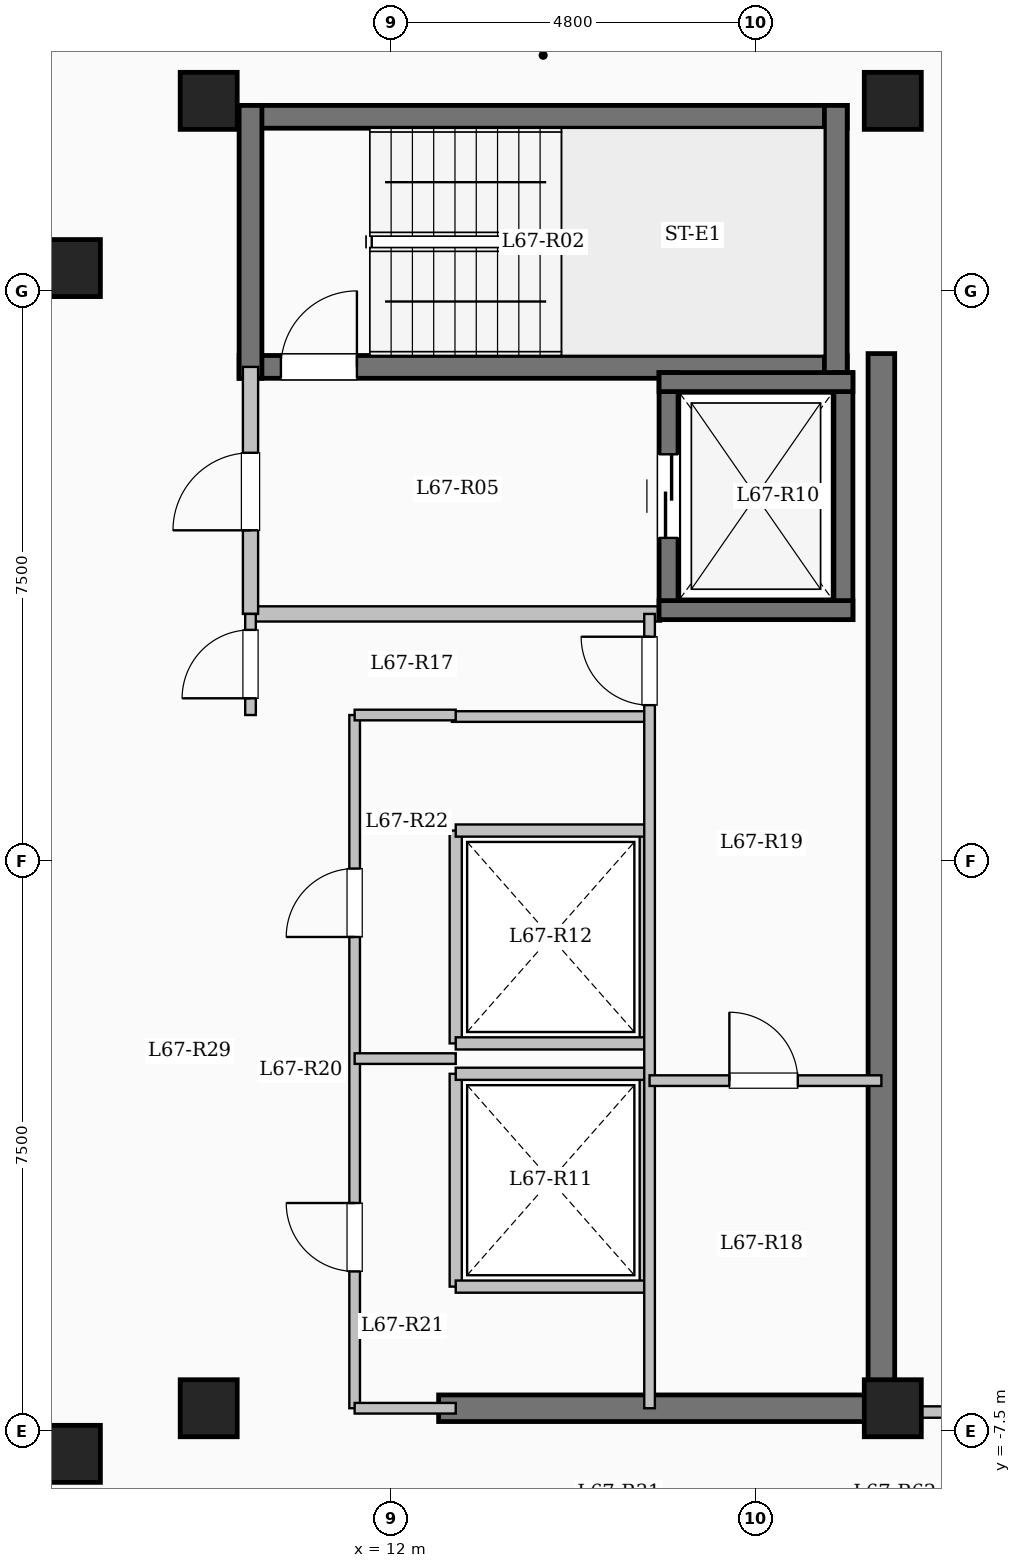
"""IFC4 building model, lengths in metres.
Left out: names, types, materials, properties, quantities, classifications, styles, units other than length and angle.
Written with IfcOpenShell. Run it as: python <this file> out.ifc"""

import sys

from ifc_helpers import new_model, si_unit, direction, frame, frame_2d, origin, origin_2d, place, context, subcontext, project, spatial, rectangle, extrude, element, fill, save


model = new_model("IFC4")
c1 = context("Model", 3, precision=1e-05, world=origin(), true_north=direction((0.0, 1.0)))
c2 = subcontext(c1, "Body", "Model", "MODEL_VIEW")
j1 = project(units=[si_unit("LENGTHUNIT", "METRE"), si_unit("PLANEANGLEUNIT", "RADIAN")], contexts=[c1])
p1 = place(None, origin())
s1 = spatial("IfcSite", under=j1, at=p1, CompositionType="ELEMENT")
p2 = place(p1, origin())
s2 = spatial("IfcBuilding", under=s1, at=p2, CompositionType="ELEMENT")
p3 = place(p2, frame((0.0, 0.0, 248.2)))
s3 = spatial("IfcBuildingStorey", under=s2, at=p3, CompositionType="ELEMENT", Elevation=248.2)
for number, where, z_axis, x_axis in (
    (1, (7.8, -7.8, 0.0), (0.0, 0.0, 1.0), (1.0, 0.0, 0.0)),
    (2, (7.8, 7.8, 0.0), (0.0, 0.0, 1.0), (1.0, 0.0, 0.0)),
    (3, (9.6, -7.2, 0.0), (0.0, 0.0, 1.0), (1.0, 0.0, 0.0)),
    (4, (9.6, 10.0, 0.0), (0.0, 0.0, 1.0), (1.0, 0.0, 0.0)),
    (5, (18.6, -7.2, 0.0), (0.0, 0.0, 1.0), (1.0, 0.0, 0.0)),
    (6, (18.6, 10.0, 0.0), (0.0, 0.0, 1.0), (1.0, 0.0, 0.0)),
):
    element("IfcColumn", number, at=place(p3, frame(where, z_axis=z_axis, x_axis=x_axis)), inside=s3, PredefinedType="COLUMN", context=c2, shape_type="SweptSolid", body=[
        extrude(rectangle(XDim=0.75, YDim=0.75, at=origin_2d()), origin(), (0.0, 0.0, 1.0), 3.35),
    ])
p4 = place(p3, frame((10.0, 9.79, 0.0), z_axis=(0.0, 0.0, 1.0), x_axis=(1.0, 0.0, 0.0)))
e7 = element("IfcWall", 7, at=p4, inside=s3, PredefinedType="SHEAR", context=c2, shape_type="SweptSolid", body=[
    extrude(rectangle(XDim=8.0, YDim=0.3, at=frame_2d((4.0, 0.0))), origin(), (0.0, 0.0, 1.0), 3.35),
])
p5 = place(p3, frame((10.0, 6.5, 0.0), z_axis=(0.0, 0.0, 1.0), x_axis=(1.0, 0.0, 0.0)))
e8 = element("IfcWall", 8, at=p5, inside=s3, PredefinedType="SHEAR", context=c2, shape_type="SweptSolid", body=[
    extrude(rectangle(XDim=8.0, YDim=0.3, at=frame_2d((4.0, 0.0))), origin(), (0.0, 0.0, 1.0), 3.35),
])
p6 = place(p5, frame((0.55, 0.0, 0.0)))
e9 = element("IfcOpeningElement", 9, at=p6, cuts=e8, PredefinedType="OPENING", context=c2, shape_type="SweptSolid", body=[
    extrude(rectangle(XDim=1.0, YDim=2.15, at=frame_2d((0.5, 1.075))), frame((0.0, 0.16, 0.0), z_axis=(0.0, -1.0, 0.0), x_axis=(1.0, 0.0, 0.0)), (0.0, 0.0, 1.0), 0.32),
])
for number, where, z_axis, x_axis in (
    (10, (10.15, 6.35, 0.0), (0.0, 0.0, 1.0), (0.0, 1.0, 0.0)),
    (11, (17.85, 6.35, 0.0), (0.0, 0.0, 1.0), (0.0, 1.0, 0.0)),
):
    element("IfcWall", number, at=place(p3, frame(where, z_axis=z_axis, x_axis=x_axis)), inside=s3, PredefinedType="SHEAR", context=c2, shape_type="SweptSolid", body=[
        extrude(rectangle(XDim=3.59, YDim=0.3, at=frame_2d((1.795, 0.0))), origin(), (0.0, 0.0, 1.0), 3.35),
    ])
p7 = place(p3, frame((10.15, 3.25, 0.0), z_axis=(0.0, 0.0, 1.0), x_axis=(1.0, 0.0, 0.0)))
e12 = element("IfcWall", 12, at=p7, inside=s3, PredefinedType="SOLIDWALL", context=c2, shape_type="SweptSolid", body=[
    extrude(rectangle(XDim=5.4, YDim=0.2, at=frame_2d((2.7, 0.0))), origin(), (0.0, 0.0, 1.0), 3.1),
])
p8 = place(p3, frame((10.15, 3.25, 0.0), z_axis=(0.0, 0.0, 1.0), x_axis=(0.0, 1.0, 0.0)))
e13 = element("IfcWall", 13, at=p8, inside=s3, PredefinedType="SOLIDWALL", context=c2, shape_type="SweptSolid", body=[
    extrude(rectangle(XDim=3.25, YDim=0.2, at=frame_2d((1.625, 0.0))), origin(), (0.0, 0.0, 1.0), 3.1),
])
p9 = place(p8, frame((1.1, 0.0, 0.0)))
e14 = element("IfcOpeningElement", 14, at=p9, cuts=e13, PredefinedType="OPENING", context=c2, shape_type="SweptSolid", body=[
    extrude(rectangle(XDim=1.02, YDim=2.15, at=frame_2d((0.51, 1.075))), frame((0.0, 0.11, 0.0), z_axis=(0.0, -1.0, 0.0), x_axis=(1.0, 0.0, 0.0)), (0.0, 0.0, 1.0), 0.22),
])
p10 = place(p3, frame((15.65, 3.175, 0.0), z_axis=(0.0, 0.0, 1.0), x_axis=(0.0, 1.0, 0.0)))
e15 = element("IfcWall", 15, at=p10, inside=s3, PredefinedType="SHEAR", context=c2, shape_type="SweptSolid", body=[
    extrude(rectangle(XDim=3.25, YDim=0.25, at=frame_2d((1.625, 0.0))), origin(), (0.0, 0.0, 1.0), 3.35),
])
p11 = place(p10, frame((1.075, 0.0, 0.0)))
e16 = element("IfcOpeningElement", 16, at=p11, cuts=e15, PredefinedType="OPENING", context=c2, shape_type="SweptSolid", body=[
    extrude(rectangle(XDim=1.1, YDim=2.15, at=frame_2d((0.55, 1.075))), frame((0.0, 0.135, 0.0), z_axis=(0.0, -1.0, 0.0), x_axis=(1.0, 0.0, 0.0)), (0.0, 0.0, 1.0), 0.27),
])
p12 = place(p3, frame((17.95, 3.175, 0.0), z_axis=(0.0, 0.0, 1.0), x_axis=(0.0, 1.0, 0.0)))
e17 = element("IfcWall", 17, at=p12, inside=s3, PredefinedType="SHEAR", context=c2, shape_type="SweptSolid", body=[
    extrude(rectangle(XDim=3.25, YDim=0.25, at=frame_2d((1.625, 0.0))), origin(), (0.0, 0.0, 1.0), 3.35),
])
for number, where, z_axis, x_axis in (
    (18, (15.525, 3.3, 0.0), (0.0, 0.0, 1.0), (1.0, 0.0, 0.0)),
    (19, (15.525, 6.3, 0.0), (0.0, 0.0, 1.0), (1.0, 0.0, 0.0)),
):
    element("IfcWall", number, at=place(p3, frame(where, z_axis=z_axis, x_axis=x_axis)), inside=s3, PredefinedType="SHEAR", context=c2, shape_type="SweptSolid", body=[
        extrude(rectangle(XDim=2.55, YDim=0.25, at=frame_2d((1.275, 0.0))), origin(), (0.0, 0.0, 1.0), 3.35),
    ])
for number, where, z_axis, x_axis in (
    (20, (12.85, -5.6, 0.0), (0.0, 0.0, 1.0), (0.0, 1.0, 0.0)),
    (21, (15.35, -5.6, 0.0), (0.0, 0.0, 1.0), (0.0, 1.0, 0.0)),
):
    element("IfcWall", number, at=place(p3, frame(where, z_axis=z_axis, x_axis=x_axis)), inside=s3, PredefinedType="SOLIDWALL", context=c2, shape_type="SweptSolid", body=[
        extrude(rectangle(XDim=2.8, YDim=0.16, at=frame_2d((1.4, 0.0))), origin(), (0.0, 0.0, 1.0), 3.1),
    ])
for number, where, z_axis, x_axis in (
    (22, (12.85, -5.6, 0.0), (0.0, 0.0, 1.0), (1.0, 0.0, 0.0)),
    (23, (12.85, -2.8, 0.0), (0.0, 0.0, 1.0), (1.0, 0.0, 0.0)),
):
    element("IfcWall", number, at=place(p3, frame(where, z_axis=z_axis, x_axis=x_axis)), inside=s3, PredefinedType="SOLIDWALL", context=c2, shape_type="SweptSolid", body=[
        extrude(rectangle(XDim=2.5, YDim=0.16, at=frame_2d((1.25, 0.0))), origin(), (0.0, 0.0, 1.0), 3.1),
    ])
for number, where, z_axis, x_axis in (
    (24, (12.85, -2.4, 0.0), (0.0, 0.0, 1.0), (0.0, 1.0, 0.0)),
    (25, (15.35, -2.4, 0.0), (0.0, 0.0, 1.0), (0.0, 1.0, 0.0)),
):
    element("IfcWall", number, at=place(p3, frame(where, z_axis=z_axis, x_axis=x_axis)), inside=s3, PredefinedType="SOLIDWALL", context=c2, shape_type="SweptSolid", body=[
        extrude(rectangle(XDim=2.8, YDim=0.16, at=frame_2d((1.4, 0.0))), origin(), (0.0, 0.0, 1.0), 3.1),
    ])
for number, where, z_axis, x_axis in (
    (26, (12.85, -2.4, 0.0), (0.0, 0.0, 1.0), (1.0, 0.0, 0.0)),
    (27, (12.85, 0.4, 0.0), (0.0, 0.0, 1.0), (1.0, 0.0, 0.0)),
):
    element("IfcWall", number, at=place(p3, frame(where, z_axis=z_axis, x_axis=x_axis)), inside=s3, PredefinedType="SOLIDWALL", context=c2, shape_type="SweptSolid", body=[
        extrude(rectangle(XDim=2.5, YDim=0.16, at=frame_2d((1.25, 0.0))), origin(), (0.0, 0.0, 1.0), 3.1),
    ])
p13 = place(p3, frame((18.45, -7.375, 0.0), z_axis=(0.0, 0.0, 1.0), x_axis=(0.0, 1.0, 0.0)))
e28 = element("IfcWall", 28, at=p13, inside=s3, PredefinedType="SHEAR", context=c2, shape_type="SweptSolid", body=[
    extrude(rectangle(XDim=14.05, YDim=0.35, at=frame_2d((7.025, 0.0))), origin(), (0.0, 0.0, 1.0), 3.35),
])
p14 = place(p3, frame((12.625, -7.2, 0.0), z_axis=(0.0, 0.0, 1.0), x_axis=(1.0, 0.0, 0.0)))
e29 = element("IfcWall", 29, at=p14, inside=s3, PredefinedType="SHEAR", context=c2, shape_type="SweptSolid", body=[
    extrude(rectangle(XDim=6.0, YDim=0.35, at=frame_2d((3.0, 0.0))), origin(), (0.0, 0.0, 1.0), 3.35),
])
p15 = place(p3, frame((12.8, 1.9, 0.0), z_axis=(0.0, 0.0, 1.0), x_axis=(1.0, 0.0, 0.0)))
e30 = element("IfcWall", 30, at=p15, inside=s3, PredefinedType="PARTITIONING", context=c2, shape_type="SweptSolid", body=[
    extrude(rectangle(XDim=2.6, YDim=0.14, at=frame_2d((1.3, 0.0))), origin(), (0.0, 0.0, 1.0), 3.1),
])
p16 = place(p3, frame((10.15, 1.92, 0.0), z_axis=(0.0, 0.0, 1.0), x_axis=(0.0, 1.0, 0.0)))
e31 = element("IfcWall", 31, at=p16, inside=s3, PredefinedType="PARTITIONING", context=c2, shape_type="SweptSolid", body=[
    extrude(rectangle(XDim=1.33, YDim=0.14, at=frame_2d((0.665, 0.0))), origin(), (0.0, 0.0, 1.0), 3.1),
])
p17 = place(p16, frame((0.22, 0.0, 0.0)))
e32 = element("IfcOpeningElement", 32, at=p17, cuts=e31, PredefinedType="OPENING", context=c2, shape_type="SweptSolid", body=[
    extrude(rectangle(XDim=0.9, YDim=2.08, at=frame_2d((0.45, 1.04))), frame((0.0, 0.08, 0.0), z_axis=(0.0, -1.0, 0.0), x_axis=(1.0, 0.0, 0.0)), (0.0, 0.0, 1.0), 0.16),
])
p18 = place(p3, frame((15.4, -7.2, 0.0), z_axis=(0.0, 0.0, 1.0), x_axis=(0.0, 1.0, 0.0)))
e33 = element("IfcWall", 33, at=p18, inside=s3, PredefinedType="PARTITIONING", context=c2, shape_type="SweptSolid", body=[
    extrude(rectangle(XDim=10.45, YDim=0.14, at=frame_2d((5.225, 0.0))), origin(), (0.0, 0.0, 1.0), 3.1),
])
p19 = place(p18, frame((9.25, 0.0, 0.0)))
e34 = element("IfcOpeningElement", 34, at=p19, cuts=e33, PredefinedType="OPENING", context=c2, shape_type="SweptSolid", body=[
    extrude(rectangle(XDim=0.9, YDim=2.08, at=frame_2d((0.45, 1.04))), frame((0.0, 0.08, 0.0), z_axis=(0.0, -1.0, 0.0), x_axis=(1.0, 0.0, 0.0)), (0.0, 0.0, 1.0), 0.16),
])
p20 = place(p3, frame((15.4, -2.89, 0.0), z_axis=(0.0, 0.0, 1.0), x_axis=(1.0, 0.0, 0.0)))
e35 = element("IfcWall", 35, at=p20, inside=s3, PredefinedType="PARTITIONING", context=c2, shape_type="SweptSolid", body=[
    extrude(rectangle(XDim=3.05, YDim=0.14, at=frame_2d((1.525, 0.0))), origin(), (0.0, 0.0, 1.0), 3.1),
])
p21 = place(p20, frame((1.05, 0.0, 0.0)))
e36 = element("IfcOpeningElement", 36, at=p21, cuts=e35, PredefinedType="OPENING", context=c2, shape_type="SweptSolid", body=[
    extrude(rectangle(XDim=0.9, YDim=2.08, at=frame_2d((0.45, 1.04))), frame((0.0, 0.08, 0.0), z_axis=(0.0, -1.0, 0.0), x_axis=(1.0, 0.0, 0.0)), (0.0, 0.0, 1.0), 0.16),
])
p22 = place(p3, frame((11.52, -7.2, 0.0), z_axis=(0.0, 0.0, 1.0), x_axis=(0.0, 1.0, 0.0)))
e37 = element("IfcWall", 37, at=p22, inside=s3, PredefinedType="PARTITIONING", context=c2, shape_type="SweptSolid", body=[
    extrude(rectangle(XDim=9.12, YDim=0.14, at=frame_2d((4.56, 0.0))), origin(), (0.0, 0.0, 1.0), 3.1),
])
p23 = place(p22, frame((1.8, 0.0, 0.0)))
e38 = element("IfcOpeningElement", 38, at=p23, cuts=e37, PredefinedType="OPENING", context=c2, shape_type="SweptSolid", body=[
    extrude(rectangle(XDim=0.9, YDim=2.08, at=frame_2d((0.45, 1.04))), frame((0.0, 0.08, 0.0), z_axis=(0.0, -1.0, 0.0), x_axis=(1.0, 0.0, 0.0)), (0.0, 0.0, 1.0), 0.16),
])
p24 = place(p22, frame((6.2, 0.0, 0.0)))
e39 = element("IfcOpeningElement", 39, at=p24, cuts=e37, PredefinedType="OPENING", context=c2, shape_type="SweptSolid", body=[
    extrude(rectangle(XDim=0.9, YDim=2.08, at=frame_2d((0.45, 1.04))), frame((0.0, 0.08, 0.0), z_axis=(0.0, -1.0, 0.0), x_axis=(1.0, 0.0, 0.0)), (0.0, 0.0, 1.0), 0.16),
])
p25 = place(p3, frame((11.52, 1.92, 0.0), z_axis=(0.0, 0.0, 1.0), x_axis=(1.0, 0.0, 0.0)))
e40 = element("IfcWall", 40, at=p25, inside=s3, PredefinedType="PARTITIONING", context=c2, shape_type="SweptSolid", body=[
    extrude(rectangle(XDim=1.33, YDim=0.14, at=frame_2d((0.665, 0.0))), origin(), (0.0, 0.0, 1.0), 3.1),
])
p26 = place(p3, frame((11.52, -7.2, 0.0), z_axis=(0.0, 0.0, 1.0), x_axis=(1.0, 0.0, 0.0)))
e41 = element("IfcWall", 41, at=p26, inside=s3, PredefinedType="PARTITIONING", context=c2, shape_type="SweptSolid", body=[
    extrude(rectangle(XDim=1.33, YDim=0.14, at=frame_2d((0.665, 0.0))), origin(), (0.0, 0.0, 1.0), 2.235),
])
p27 = place(p3, frame((11.52, -2.6, 0.0), z_axis=(0.0, 0.0, 1.0), x_axis=(1.0, 0.0, 0.0)))
e42 = element("IfcWall", 42, at=p27, inside=s3, PredefinedType="PARTITIONING", context=c2, shape_type="SweptSolid", body=[
    extrude(rectangle(XDim=1.33, YDim=0.14, at=frame_2d((0.665, 0.0))), origin(), (0.0, 0.0, 1.0), 3.1),
])
p28 = place(p3, frame((18.45, -7.25, 0.0), z_axis=(0.0, 0.0, 1.0), x_axis=(1.0, 0.0, 0.0)))
e43 = element("IfcWall", 43, at=p28, inside=s3, PredefinedType="PARTITIONING", context=c2, shape_type="SweptSolid", body=[
    extrude(rectangle(XDim=4.23, YDim=0.15, at=frame_2d((2.115, 0.0))), origin(), (0.0, 0.0, 1.0), 3.1),
])
p29 = place(p28, frame((1.5, 0.0, 0.0)))
e44 = element("IfcOpeningElement", 44, at=p29, cuts=e43, PredefinedType="OPENING", context=c2, shape_type="SweptSolid", body=[
    extrude(rectangle(XDim=1.08, YDim=2.15, at=frame_2d((0.54, 1.075))), frame((0.0, 0.085, 0.0), z_axis=(0.0, -1.0, 0.0), x_axis=(1.0, 0.0, 0.0)), (0.0, 0.0, 1.0), 0.17),
])
p30 = place(p6, origin())
e45 = element("IfcDoor", 45, at=p30, inside=s3, OperationType="SINGLE_SWING_RIGHT", PredefinedType="DOOR", context=c2, shape_type="SweptSolid", body=[
    extrude(rectangle(XDim=1.0, YDim=2.15, at=frame_2d((0.5, 1.075))), frame((0.0, 0.025, 0.0), z_axis=(0.0, -1.0, 0.0), x_axis=(1.0, 0.0, 0.0)), (0.0, 0.0, 1.0), 0.05),
])
fill(e9, e45)
p31 = place(p9, origin())
e46 = element("IfcDoor", 46, at=p31, inside=s3, OperationType="SINGLE_SWING_LEFT", PredefinedType="DOOR", context=c2, shape_type="SweptSolid", body=[
    extrude(rectangle(XDim=1.02, YDim=2.15, at=frame_2d((0.51, 1.075))), frame((0.0, 0.025, 0.0), z_axis=(0.0, -1.0, 0.0), x_axis=(1.0, 0.0, 0.0)), (0.0, 0.0, 1.0), 0.05),
])
fill(e14, e46)
p32 = place(p11, origin())
e47 = element("IfcDoor", 47, at=p32, inside=s3, OperationType="SLIDING_TO_LEFT", PredefinedType="DOOR", context=c2, shape_type="SweptSolid", body=[
    extrude(rectangle(XDim=1.1, YDim=2.15, at=frame_2d((0.55, 1.075))), frame((0.0, 0.025, 0.0), z_axis=(0.0, -1.0, 0.0), x_axis=(1.0, 0.0, 0.0)), (0.0, 0.0, 1.0), 0.05),
])
fill(e16, e47)
p33 = place(p17, origin())
e48 = element("IfcDoor", 48, at=p33, inside=s3, OperationType="SINGLE_SWING_LEFT", PredefinedType="DOOR", context=c2, shape_type="SweptSolid", body=[
    extrude(rectangle(XDim=0.9, YDim=2.08, at=frame_2d((0.45, 1.04))), frame((0.0, 0.025, 0.0), z_axis=(0.0, -1.0, 0.0), x_axis=(1.0, 0.0, 0.0)), (0.0, 0.0, 1.0), 0.05),
])
fill(e32, e48)
p34 = place(p19, origin())
e49 = element("IfcDoor", 49, at=p34, inside=s3, OperationType="SINGLE_SWING_RIGHT", PredefinedType="DOOR", context=c2, shape_type="SweptSolid", body=[
    extrude(rectangle(XDim=0.9, YDim=2.08, at=frame_2d((0.45, 1.04))), frame((0.0, 0.025, 0.0), z_axis=(0.0, -1.0, 0.0), x_axis=(1.0, 0.0, 0.0)), (0.0, 0.0, 1.0), 0.05),
])
fill(e34, e49)
p35 = place(p21, origin())
e50 = element("IfcDoor", 50, at=p35, inside=s3, OperationType="SINGLE_SWING_LEFT", PredefinedType="DOOR", context=c2, shape_type="SweptSolid", body=[
    extrude(rectangle(XDim=0.9, YDim=2.08, at=frame_2d((0.45, 1.04))), frame((0.0, 0.025, 0.0), z_axis=(0.0, -1.0, 0.0), x_axis=(1.0, 0.0, 0.0)), (0.0, 0.0, 1.0), 0.05),
])
fill(e36, e50)
p36 = place(p23, origin())
e51 = element("IfcDoor", 51, at=p36, inside=s3, OperationType="SINGLE_SWING_RIGHT", PredefinedType="DOOR", context=c2, shape_type="SweptSolid", body=[
    extrude(rectangle(XDim=0.9, YDim=2.08, at=frame_2d((0.45, 1.04))), frame((0.0, 0.025, 0.0), z_axis=(0.0, -1.0, 0.0), x_axis=(1.0, 0.0, 0.0)), (0.0, 0.0, 1.0), 0.05),
])
fill(e38, e51)
p37 = place(p24, origin())
e52 = element("IfcDoor", 52, at=p37, inside=s3, OperationType="SINGLE_SWING_LEFT", PredefinedType="DOOR", context=c2, shape_type="SweptSolid", body=[
    extrude(rectangle(XDim=0.9, YDim=2.08, at=frame_2d((0.45, 1.04))), frame((0.0, 0.025, 0.0), z_axis=(0.0, -1.0, 0.0), x_axis=(1.0, 0.0, 0.0)), (0.0, 0.0, 1.0), 0.05),
])
fill(e39, e52)
save(model, sys.argv[1])
